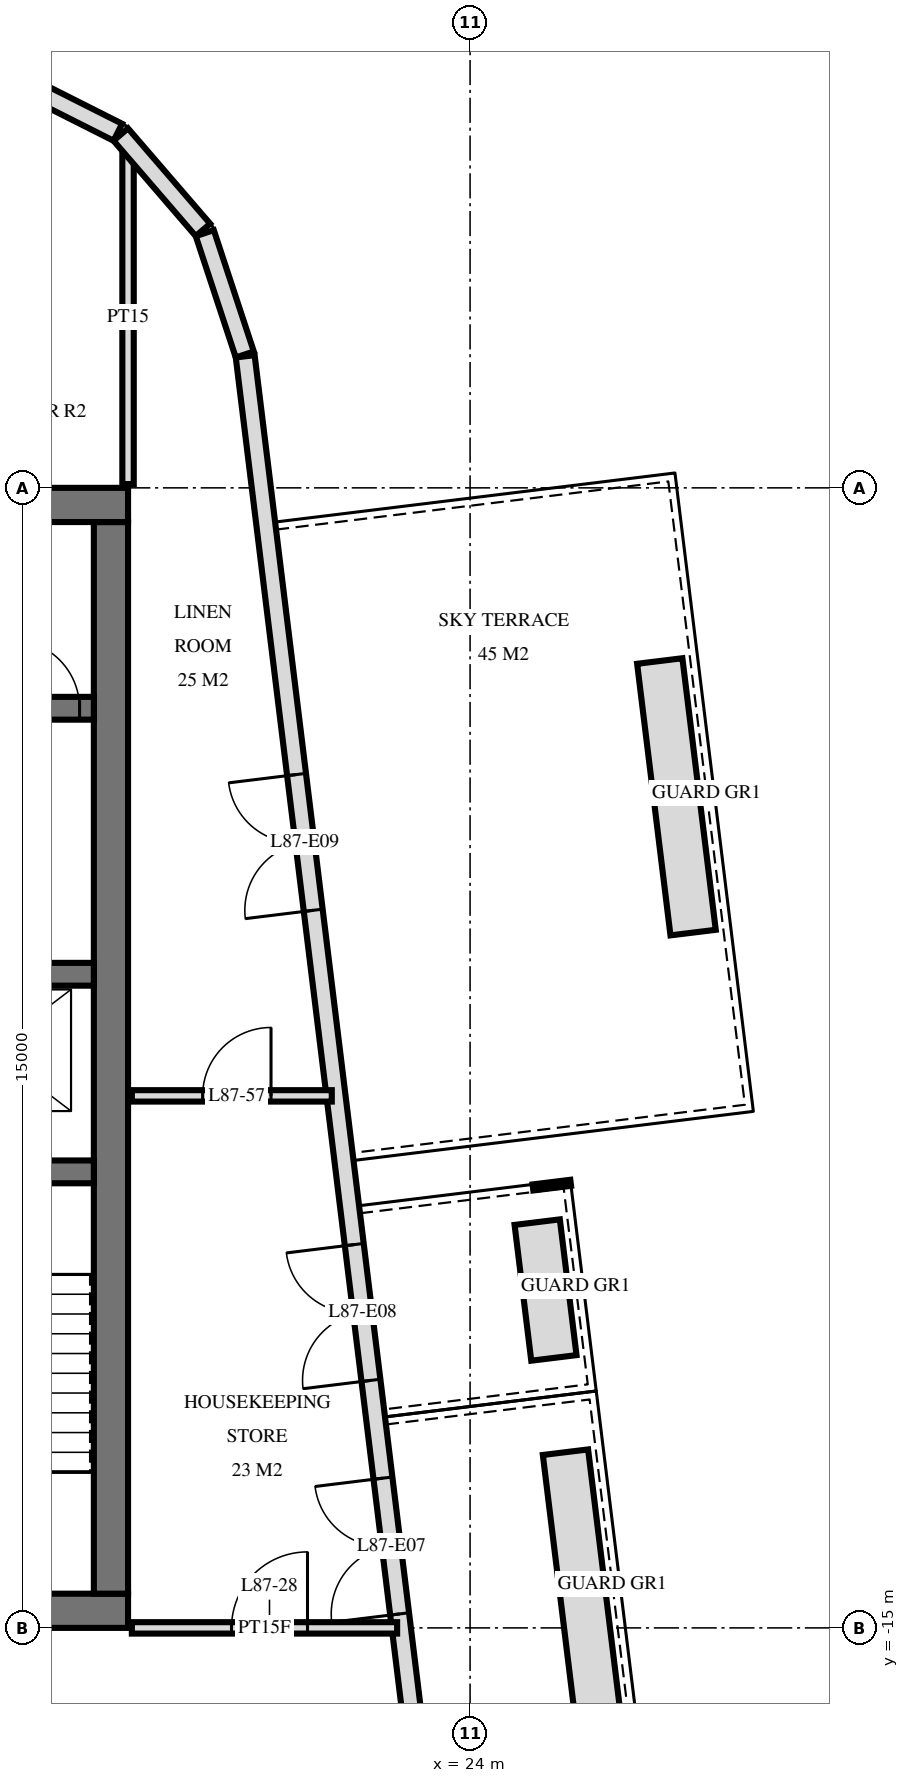
"""IFC4 building model, lengths in metres.
Left out: names, types, materials, properties, quantities, classifications, styles, units other than length and angle.
Written with IfcOpenShell. Run it as: python <this file> out.ifc"""

import sys

from ifc_helpers import new_model, si_unit, direction, frame, frame_2d, origin, place, context, subcontext, project, spatial, rectangle, extrude, element, fill, save


model = new_model("IFC4")
c1 = context("Model", 3, precision=1e-05, world=origin(), true_north=direction((0.0, 1.0)))
c2 = subcontext(c1, "Body", "Model", "MODEL_VIEW")
j1 = project(units=[si_unit("LENGTHUNIT", "METRE"), si_unit("PLANEANGLEUNIT", "RADIAN")], contexts=[c1])
p1 = place(None, origin())
s1 = spatial("IfcSite", under=j1, at=p1, CompositionType="ELEMENT")
p2 = place(p1, origin())
s2 = spatial("IfcBuilding", under=s1, at=p2, CompositionType="ELEMENT")
p3 = place(p2, frame((0.0, 0.0, 330.6)))
s3 = spatial("IfcBuildingStorey", under=s2, at=p3, CompositionType="ELEMENT", Elevation=330.6)
p4 = place(p3, frame((10.0, -0.225, 0.0), z_axis=(0.0, 0.0, 1.0), x_axis=(1.0, 0.0, 0.0)))
e1 = element("IfcWall", 1, at=p4, inside=s3, PredefinedType="SHEAR", context=c2, shape_type="SweptSolid", body=[
    extrude(rectangle(XDim=9.5, YDim=0.45, at=frame_2d((4.75, 0.0))), origin(), (0.0, 0.0, 1.0), 4.0),
])
p5 = place(p3, frame((10.0, -14.775, 0.0), z_axis=(0.0, 0.0, 1.0), x_axis=(1.0, 0.0, 0.0)))
e2 = element("IfcWall", 2, at=p5, inside=s3, PredefinedType="SHEAR", context=c2, shape_type="SweptSolid", body=[
    extrude(rectangle(XDim=9.5, YDim=0.45, at=frame_2d((4.75, 0.0))), origin(), (0.0, 0.0, 1.0), 4.0),
])
p6 = place(p5, frame((7.1, 0.0, 0.0)))
e3 = element("IfcOpeningElement", 3, at=p6, cuts=e2, PredefinedType="OPENING", context=c2, shape_type="SweptSolid", body=[
    extrude(rectangle(XDim=1.2, YDim=2.1, at=frame_2d((0.6, 1.05))), frame((0.0, 0.235, 0.0), z_axis=(0.0, -1.0, 0.0), x_axis=(1.0, 0.0, 0.0)), (0.0, 0.0, 1.0), 0.47),
])
p7 = place(p5, frame((4.15, 0.0, 0.0)))
e4 = element("IfcOpeningElement", 4, at=p7, cuts=e2, PredefinedType="OPENING", context=c2, shape_type="SweptSolid", body=[
    extrude(rectangle(XDim=1.1, YDim=2.1, at=frame_2d((0.55, 1.05))), frame((0.0, 0.235, 0.0), z_axis=(0.0, -1.0, 0.0), x_axis=(1.0, 0.0, 0.0)), (0.0, 0.0, 1.0), 0.47),
])
p8 = place(p3, frame((19.275, -14.55, 0.0), z_axis=(0.0, 0.0, 1.0), x_axis=(0.0, 1.0, 0.0)))
e5 = element("IfcWall", 5, at=p8, inside=s3, PredefinedType="SHEAR", context=c2, shape_type="SweptSolid", body=[
    extrude(rectangle(XDim=14.1, YDim=0.45, at=frame_2d((7.05, 0.0))), origin(), (0.0, 0.0, 1.0), 4.0),
])
p9 = place(p3, frame((10.35, -2.9, 0.0), z_axis=(0.0, 0.0, 1.0), x_axis=(1.0, 0.0, 0.0)))
e6 = element("IfcWall", 6, at=p9, inside=s3, PredefinedType="SHEAR", context=c2, shape_type="SweptSolid", body=[
    extrude(rectangle(XDim=8.7, YDim=0.3, at=frame_2d((4.35, 0.0))), origin(), (0.0, 0.0, 1.0), 4.0),
])
p10 = place(p9, frame((0.8, 0.0, 0.0)))
e7 = element("IfcOpeningElement", 7, at=p10, cuts=e6, PredefinedType="OPENING", context=c2, shape_type="SweptSolid", body=[
    extrude(rectangle(XDim=1.1, YDim=2.1, at=frame_2d((0.55, 1.05))), frame((0.0, 0.16, 0.0), z_axis=(0.0, -1.0, 0.0), x_axis=(1.0, 0.0, 0.0)), (0.0, 0.0, 1.0), 0.32),
])
p11 = place(p9, frame((3.8, 0.0, 0.0)))
e8 = element("IfcOpeningElement", 8, at=p11, cuts=e6, PredefinedType="OPENING", context=c2, shape_type="SweptSolid", body=[
    extrude(rectangle(XDim=1.1, YDim=2.1, at=frame_2d((0.55, 1.05))), frame((0.0, 0.16, 0.0), z_axis=(0.0, -1.0, 0.0), x_axis=(1.0, 0.0, 0.0)), (0.0, 0.0, 1.0), 0.32),
])
p12 = place(p9, frame((6.188, 0.0, 0.0)))
e9 = element("IfcOpeningElement", 9, at=p12, cuts=e6, PredefinedType="OPENING", context=c2, shape_type="SweptSolid", body=[
    extrude(rectangle(XDim=0.9, YDim=2.1, at=frame_2d((0.45, 1.05))), frame((0.0, 0.16, 0.0), z_axis=(0.0, -1.0, 0.0), x_axis=(1.0, 0.0, 0.0)), (0.0, 0.0, 1.0), 0.32),
])
p13 = place(p9, frame((7.613, 0.0, 0.0)))
e10 = element("IfcOpeningElement", 10, at=p13, cuts=e6, PredefinedType="OPENING", context=c2, shape_type="SweptSolid", body=[
    extrude(rectangle(XDim=0.9, YDim=2.1, at=frame_2d((0.45, 1.05))), frame((0.0, 0.16, 0.0), z_axis=(0.0, -1.0, 0.0), x_axis=(1.0, 0.0, 0.0)), (0.0, 0.0, 1.0), 0.32),
])
p14 = place(p3, frame((10.35, -6.4, 0.0), z_axis=(0.0, 0.0, 1.0), x_axis=(1.0, 0.0, 0.0)))
e11 = element("IfcWall", 11, at=p14, inside=s3, PredefinedType="SHEAR", context=c2, shape_type="SweptSolid", body=[
    extrude(rectangle(XDim=8.7, YDim=0.3, at=frame_2d((4.35, 0.0))), origin(), (0.0, 0.0, 1.0), 4.0),
])
p15 = place(p14, frame((6.8, 0.0, 0.0)))
e12 = element("IfcOpeningElement", 12, at=p15, cuts=e11, PredefinedType="OPENING", context=c2, shape_type="SweptSolid", body=[
    extrude(rectangle(XDim=1.1, YDim=2.1, at=frame_2d((0.55, 1.05))), frame((0.0, 0.16, 0.0), z_axis=(0.0, -1.0, 0.0), x_axis=(1.0, 0.0, 0.0)), (0.0, 0.0, 1.0), 0.32),
])
p16 = place(p3, frame((10.35, -9.0, 0.0), z_axis=(0.0, 0.0, 1.0), x_axis=(1.0, 0.0, 0.0)))
e13 = element("IfcWall", 13, at=p16, inside=s3, PredefinedType="SHEAR", context=c2, shape_type="SweptSolid", body=[
    extrude(rectangle(XDim=8.7, YDim=0.3, at=frame_2d((4.35, 0.0))), origin(), (0.0, 0.0, 1.0), 4.0),
])
p17 = place(p16, frame((3.8, 0.0, 0.0)))
e14 = element("IfcOpeningElement", 14, at=p17, cuts=e13, PredefinedType="OPENING", context=c2, shape_type="SweptSolid", body=[
    extrude(rectangle(XDim=1.1, YDim=2.1, at=frame_2d((0.55, 1.05))), frame((0.0, 0.16, 0.0), z_axis=(0.0, -1.0, 0.0), x_axis=(1.0, 0.0, 0.0)), (0.0, 0.0, 1.0), 0.32),
])
p18 = place(p3, frame((21.036, 1.755, 0.0), z_axis=(0.0, 0.0, 1.0), x_axis=(-0.313046160822, 0.949737911844, 0.0)))
e15 = element("IfcWall", 15, at=p18, inside=s3, PredefinedType="SOLIDWALL", context=c2, shape_type="SweptSolid", body=[
    extrude(rectangle(XDim=1.681, YDim=0.25, at=frame_2d((0.841, 0.0))), origin(), (0.0, 0.0, 1.0), 3.72),
])
for number, where, z_axis, x_axis in (
    (16, (20.485, 3.394, 0.0), (0.0, 0.0, 1.0), (-0.653, 0.758, 0.0)),
    (17, (19.366, 4.679, 0.0), (0.0, 0.0, 1.0), (-0.893, 0.45, 0.0)),
):
    element("IfcWall", number, at=place(p3, frame(where, z_axis=z_axis, x_axis=x_axis)), inside=s3, PredefinedType="SOLIDWALL", context=c2, shape_type="SweptSolid", body=[
        extrude(rectangle(XDim=1.656, YDim=0.25, at=frame_2d((0.828, 0.0))), origin(), (0.0, 0.0, 1.0), 3.72),
    ])
p19 = place(p3, frame((23.375, -17.277, 0.0), z_axis=(0.0, 0.0, 1.0), x_axis=(-0.121862878281, 0.992546945437, 0.0)))
e18 = element("IfcWall", 18, at=p19, inside=s3, PredefinedType="SOLIDWALL", context=c2, shape_type="SweptSolid", body=[
    extrude(rectangle(XDim=19.151, YDim=0.25, at=frame_2d((9.575, 0.0))), origin(), (0.0, 0.0, 1.0), 3.72),
])
p20 = place(p19, frame((2.479, 0.0, 0.0)))
e19 = element("IfcOpeningElement", 19, at=p20, cuts=e18, PredefinedType="OPENING", context=c2, shape_type="SweptSolid", body=[
    extrude(rectangle(XDim=1.8, YDim=2.4, at=frame_2d((0.9, 1.2))), frame((0.0, 0.135, 0.0), z_axis=(0.0, -1.0, 0.0), x_axis=(1.0, 0.0, 0.0)), (0.0, 0.0, 1.0), 0.27),
])
p21 = place(p19, frame((5.575, 0.0, 0.0)))
e20 = element("IfcOpeningElement", 20, at=p21, cuts=e18, PredefinedType="OPENING", context=c2, shape_type="SweptSolid", body=[
    extrude(rectangle(XDim=1.8, YDim=2.4, at=frame_2d((0.9, 1.2))), frame((0.0, 0.135, 0.0), z_axis=(0.0, -1.0, 0.0), x_axis=(1.0, 0.0, 0.0)), (0.0, 0.0, 1.0), 0.27),
])
p22 = place(p19, frame((11.807, 0.0, 0.0)))
e21 = element("IfcOpeningElement", 21, at=p22, cuts=e18, PredefinedType="OPENING", context=c2, shape_type="SweptSolid", body=[
    extrude(rectangle(XDim=1.8, YDim=2.4, at=frame_2d((0.9, 1.2))), frame((0.0, 0.135, 0.0), z_axis=(0.0, -1.0, 0.0), x_axis=(1.0, 0.0, 0.0)), (0.0, 0.0, 1.0), 0.27),
])
p23 = place(p3, frame((25.255, -12.688, 0.0), z_axis=(0.0, 0.0, 1.0), x_axis=(0.121864343918, -0.992546765488, 0.0)))
e22 = element("IfcWall", 22, at=p23, inside=s3, PredefinedType="USERDEFINED", context=c2, shape_type="SweptSolid", body=[
    extrude(rectangle(XDim=3.6, YDim=0.6, at=frame_2d((1.8, 0.0))), origin(), (0.0, 0.0, 1.0), 0.65),
])
p24 = place(p3, frame((24.883, -9.662, 0.0), z_axis=(0.0, 0.0, 1.0), x_axis=(0.121830336845, -0.992550940267, 0.0)))
e23 = element("IfcWall", 23, at=p24, inside=s3, PredefinedType="USERDEFINED", context=c2, shape_type="SweptSolid", body=[
    extrude(rectangle(XDim=1.8, YDim=0.6, at=frame_2d((0.9, 0.0))), origin(), (0.0, 0.0, 1.0), 0.65),
])
p25 = place(p3, frame((26.496, -2.278, 0.0), z_axis=(0.0, 0.0, 1.0), x_axis=(0.121864343918, -0.992546765488, 0.0)))
e24 = element("IfcWall", 24, at=p25, inside=s3, PredefinedType="USERDEFINED", context=c2, shape_type="SweptSolid", body=[
    extrude(rectangle(XDim=3.6, YDim=0.6, at=frame_2d((1.8, 0.0))), origin(), (0.0, 0.0, 1.0), 0.65),
])
p26 = place(p3, frame((19.5, 0.05, 0.0), z_axis=(0.0, 0.0, 1.0), x_axis=(0.0, 1.0, 0.0)))
e25 = element("IfcWall", 25, at=p26, inside=s3, PredefinedType="PARTITIONING", context=c2, shape_type="SweptSolid", body=[
    extrude(rectangle(XDim=4.403, YDim=0.15, at=frame_2d((2.202, 0.0))), origin(), (0.0, 0.0, 1.0), 3.72),
])
p27 = place(p3, frame((19.55, -15.0, 0.0), z_axis=(0.0, 0.0, 1.0), x_axis=(1.0, 0.0, 0.0)))
e26 = element("IfcWall", 26, at=p27, inside=s3, PredefinedType="PARTITIONING", context=c2, shape_type="SweptSolid", body=[
    extrude(rectangle(XDim=3.49, YDim=0.15, at=frame_2d((1.745, 0.0))), origin(), (0.0, 0.0, 1.0), 3.72),
])
p28 = place(p27, frame((1.311, 0.0, 0.0)))
e27 = element("IfcOpeningElement", 27, at=p28, cuts=e26, PredefinedType="OPENING", context=c2, shape_type="SweptSolid", body=[
    extrude(rectangle(XDim=1.0, YDim=2.1, at=frame_2d((0.5, 1.05))), frame((0.0, 0.085, 0.0), z_axis=(0.0, -1.0, 0.0), x_axis=(1.0, 0.0, 0.0)), (0.0, 0.0, 1.0), 0.17),
])
p29 = place(p3, frame((19.55, -8.0, 0.0), z_axis=(0.0, 0.0, 1.0), x_axis=(1.0, 0.0, 0.0)))
e28 = element("IfcWall", 28, at=p29, inside=s3, PredefinedType="PARTITIONING", context=c2, shape_type="SweptSolid", body=[
    extrude(rectangle(XDim=2.631, YDim=0.15, at=frame_2d((1.315, 0.0))), origin(), (0.0, 0.0, 1.0), 3.253),
])
p30 = place(p29, frame((0.931, 0.0, 0.0)))
e29 = element("IfcOpeningElement", 29, at=p30, cuts=e28, PredefinedType="OPENING", context=c2, shape_type="SweptSolid", body=[
    extrude(rectangle(XDim=0.9, YDim=2.1, at=frame_2d((0.45, 1.05))), frame((0.0, 0.085, 0.0), z_axis=(0.0, -1.0, 0.0), x_axis=(1.0, 0.0, 0.0)), (0.0, 0.0, 1.0), 0.17),
])
p31 = place(p20, origin())
e30 = element("IfcDoor", 30, at=p31, inside=s3, OperationType="DOUBLE_DOOR_SINGLE_SWING", PredefinedType="DOOR", context=c2, shape_type="SweptSolid", body=[
    extrude(rectangle(XDim=1.8, YDim=2.4, at=frame_2d((0.9, 1.2))), frame((0.0, 0.025, 0.0), z_axis=(0.0, -1.0, 0.0), x_axis=(1.0, 0.0, 0.0)), (0.0, 0.0, 1.0), 0.05),
])
fill(e19, e30)
p32 = place(p21, origin())
e31 = element("IfcDoor", 31, at=p32, inside=s3, OperationType="DOUBLE_DOOR_SINGLE_SWING", PredefinedType="DOOR", context=c2, shape_type="SweptSolid", body=[
    extrude(rectangle(XDim=1.8, YDim=2.4, at=frame_2d((0.9, 1.2))), frame((0.0, 0.025, 0.0), z_axis=(0.0, -1.0, 0.0), x_axis=(1.0, 0.0, 0.0)), (0.0, 0.0, 1.0), 0.05),
])
fill(e20, e31)
p33 = place(p22, origin())
e32 = element("IfcDoor", 32, at=p33, inside=s3, OperationType="DOUBLE_DOOR_SINGLE_SWING", PredefinedType="DOOR", context=c2, shape_type="SweptSolid", body=[
    extrude(rectangle(XDim=1.8, YDim=2.4, at=frame_2d((0.9, 1.2))), frame((0.0, 0.025, 0.0), z_axis=(0.0, -1.0, 0.0), x_axis=(1.0, 0.0, 0.0)), (0.0, 0.0, 1.0), 0.05),
])
fill(e21, e32)
p34 = place(p13, origin())
e33 = element("IfcDoor", 33, at=p34, inside=s3, OperationType="SINGLE_SWING_RIGHT", PredefinedType="DOOR", context=c2, shape_type="SweptSolid", body=[
    extrude(rectangle(XDim=0.9, YDim=2.1, at=frame_2d((0.45, 1.05))), frame((0.0, 0.025, 0.0), z_axis=(0.0, -1.0, 0.0), x_axis=(1.0, 0.0, 0.0)), (0.0, 0.0, 1.0), 0.05),
])
fill(e10, e33)
p35 = place(p28, origin())
e34 = element("IfcDoor", 34, at=p35, inside=s3, OperationType="SINGLE_SWING_LEFT", PredefinedType="DOOR", context=c2, shape_type="SweptSolid", body=[
    extrude(rectangle(XDim=1.0, YDim=2.1, at=frame_2d((0.5, 1.05))), frame((0.0, 0.025, 0.0), z_axis=(0.0, -1.0, 0.0), x_axis=(1.0, 0.0, 0.0)), (0.0, 0.0, 1.0), 0.05),
])
fill(e27, e34)
p36 = place(p30, origin())
e35 = element("IfcDoor", 35, at=p36, inside=s3, OperationType="SINGLE_SWING_LEFT", PredefinedType="DOOR", context=c2, shape_type="SweptSolid", body=[
    extrude(rectangle(XDim=0.9, YDim=2.1, at=frame_2d((0.45, 1.05))), frame((0.0, 0.025, 0.0), z_axis=(0.0, -1.0, 0.0), x_axis=(1.0, 0.0, 0.0)), (0.0, 0.0, 1.0), 0.05),
])
fill(e29, e35)
save(model, sys.argv[1])
